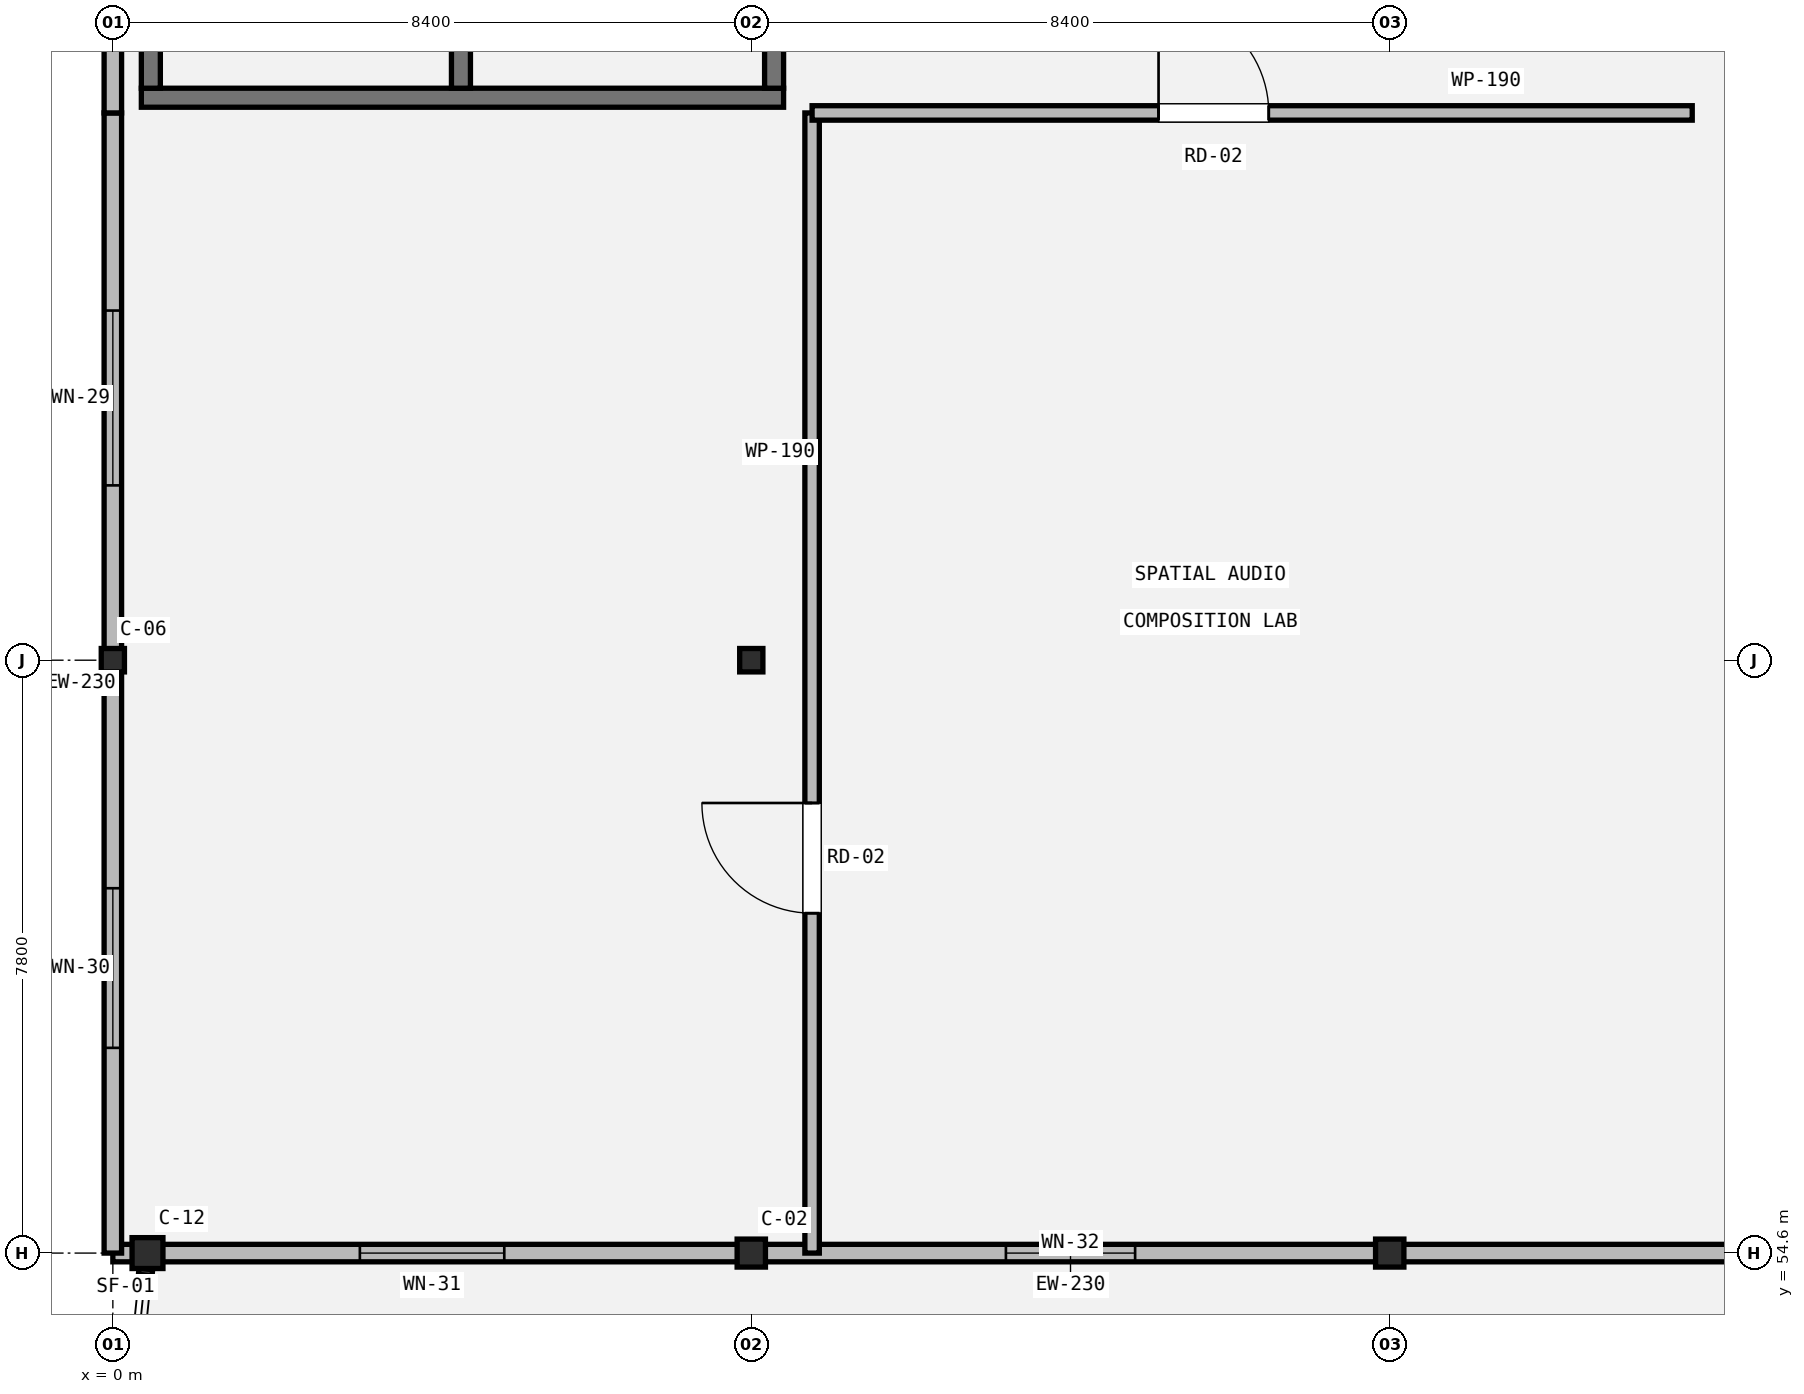
"""IFC4 building model, lengths in metres.
Left out: names, types, materials, properties, quantities, classifications, styles, units other than length and angle.
Written with IfcOpenShell. Run it as: python <this file> out.ifc"""

import sys

from ifc_helpers import new_model, si_unit, direction, frame, frame_2d, origin, origin_2d, place, context, subcontext, project, spatial, rectangle, hollow_circle, i_section, extrude, element, fill, save


model = new_model("IFC4")
c1 = context("Model", 3, precision=1e-05, world=origin(), true_north=direction((0.0, 1.0)))
c2 = subcontext(c1, "Body", "Model", "MODEL_VIEW")
j1 = project(units=[si_unit("LENGTHUNIT", "METRE"), si_unit("PLANEANGLEUNIT", "RADIAN")], contexts=[c1])
p1 = place(None, origin())
s1 = spatial("IfcSite", under=j1, at=p1, CompositionType="ELEMENT")
p2 = place(p1, origin())
s2 = spatial("IfcBuilding", under=s1, at=p2, CompositionType="ELEMENT")
p3 = place(p2, frame((0.0, 0.0, 15.0)))
s3 = spatial("IfcBuildingStorey", under=s2, at=p3, CompositionType="ELEMENT", Elevation=15.0)
for number, where, z_axis, x_axis in (
    (1, (8.4, 54.6, 0.0), (0.0, 0.0, 1.0), (1.0, 0.0, 0.0)),
    (2, (16.8, 54.6, 0.0), (0.0, 0.0, 1.0), (1.0, 0.0, 0.0)),
):
    element("IfcColumn", number, at=place(p3, frame(where, z_axis=z_axis, x_axis=x_axis)), inside=s3, PredefinedType="COLUMN", context=c2, shape_type="SweptSolid", body=[
        extrude(i_section(OverallWidth=0.373, OverallDepth=0.368, WebThickness=0.014, FlangeThickness=0.024, FilletRadius=0.015, at=origin_2d()), origin(), (0.0, 0.0, 1.0), 4.2),
    ])
p4 = place(p3, frame((0.456, 54.6, 0.0), z_axis=(0.0, 0.0, 1.0), x_axis=(1.0, 0.0, 0.0)))
e3 = element("IfcColumn", 3, at=p4, inside=s3, PredefinedType="COLUMN", context=c2, shape_type="SweptSolid", body=[
    extrude(hollow_circle(Radius=0.203, WallThickness=0.016, at=origin_2d()), origin(), (0.0, 0.0, 1.0), 4.2),
])
for number, where, z_axis, x_axis in (
    (4, (0.0, 62.4, 0.0), (0.0, 0.0, 1.0), (1.0, 0.0, 0.0)),
    (5, (8.4, 62.4, 0.0), (0.0, 0.0, 1.0), (1.0, 0.0, 0.0)),
):
    element("IfcColumn", number, at=place(p3, frame(where, z_axis=z_axis, x_axis=x_axis)), inside=s3, PredefinedType="COLUMN", context=c2, shape_type="SweptSolid", body=[
        extrude(i_section(OverallWidth=0.305, OverallDepth=0.308, WebThickness=0.01, FlangeThickness=0.015, FilletRadius=0.015, at=origin_2d()), origin(), (0.0, 0.0, 1.0), 4.2),
    ])
p5 = place(p3, frame((25.2, 54.6, 0.0), z_axis=(0.0, 0.0, 1.0), x_axis=(-1.0, 0.0, 0.0)))
e6 = element("IfcWall", 6, at=p5, inside=s3, PredefinedType="STANDARD", context=c2, shape_type="SweptSolid", body=[
    extrude(rectangle(XDim=25.2, YDim=0.23, at=frame_2d((12.6, 0.0))), origin(), (0.0, 0.0, 1.0), 3.413),
])
p6 = place(p5, frame((2.9, 0.0, 0.9)))
e7 = element("IfcOpeningElement", 7, at=p6, cuts=e6, PredefinedType="OPENING", context=c2, shape_type="SweptSolid", body=[
    extrude(rectangle(XDim=0.9, YDim=1.35, at=frame_2d((0.45, 0.675))), frame((0.0, 0.125, 0.0), z_axis=(0.0, -1.0, 0.0), x_axis=(1.0, 0.0, 0.0)), (0.0, 0.0, 1.0), 0.25),
])
p7 = place(p5, frame((11.75, 0.0, 0.9)))
e8 = element("IfcOpeningElement", 8, at=p7, cuts=e6, PredefinedType="OPENING", context=c2, shape_type="SweptSolid", body=[
    extrude(rectangle(XDim=1.7, YDim=1.95, at=frame_2d((0.85, 0.975))), frame((0.0, 0.125, 0.0), z_axis=(0.0, -1.0, 0.0), x_axis=(1.0, 0.0, 0.0)), (0.0, 0.0, 1.0), 0.25),
])
p8 = place(p5, frame((20.05, 0.0, 0.9)))
e9 = element("IfcOpeningElement", 9, at=p8, cuts=e6, PredefinedType="OPENING", context=c2, shape_type="SweptSolid", body=[
    extrude(rectangle(XDim=1.9, YDim=1.95, at=frame_2d((0.95, 0.975))), frame((0.0, 0.125, 0.0), z_axis=(0.0, -1.0, 0.0), x_axis=(1.0, 0.0, 0.0)), (0.0, 0.0, 1.0), 0.25),
])
p9 = place(p3, frame((0.0, 54.6, 0.0), z_axis=(0.0, 0.0, 1.0), x_axis=(0.0, 1.0, 0.0)))
e10 = element("IfcWall", 10, at=p9, inside=s3, PredefinedType="STANDARD", context=c2, shape_type="SweptSolid", body=[
    extrude(rectangle(XDim=15.0, YDim=0.23, at=frame_2d((7.5, 0.0))), origin(), (0.0, 0.0, 1.0), 3.419),
])
p10 = place(p9, frame((2.7, 0.0, 0.9)))
e11 = element("IfcOpeningElement", 11, at=p10, cuts=e10, PredefinedType="OPENING", context=c2, shape_type="SweptSolid", body=[
    extrude(rectangle(XDim=2.1, YDim=1.95, at=frame_2d((1.05, 0.975))), frame((0.0, 0.125, 0.0), z_axis=(0.0, -1.0, 0.0), x_axis=(1.0, 0.0, 0.0)), (0.0, 0.0, 1.0), 0.25),
])
p11 = place(p9, frame((10.1, 0.0, 0.9)))
e12 = element("IfcOpeningElement", 12, at=p11, cuts=e10, PredefinedType="OPENING", context=c2, shape_type="SweptSolid", body=[
    extrude(rectangle(XDim=2.3, YDim=1.95, at=frame_2d((1.15, 0.975))), frame((0.0, 0.125, 0.0), z_axis=(0.0, -1.0, 0.0), x_axis=(1.0, 0.0, 0.0)), (0.0, 0.0, 1.0), 0.25),
])
p12 = place(p3, frame((0.0, 69.6, 0.0), z_axis=(0.0, 0.0, 1.0), x_axis=(0.0, 1.0, 0.0)))
e13 = element("IfcWall", 13, at=p12, inside=s3, PredefinedType="STANDARD", context=c2, shape_type="SweptSolid", body=[
    extrude(rectangle(XDim=11.0, YDim=0.23, at=frame_2d((5.5, 0.0))), origin(), (0.0, 0.0, 1.0), 2.964),
])
p13 = place(p3, frame((8.825, 69.8, 0.0), z_axis=(0.0, 0.0, 1.0), x_axis=(-1.0, 0.0, 0.0)))
e14 = element("IfcWall", 14, at=p13, inside=s3, PredefinedType="SHEAR", context=c2, shape_type="SweptSolid", body=[
    extrude(rectangle(XDim=8.45, YDim=0.25, at=frame_2d((4.225, 0.0))), origin(), (0.0, 0.0, 1.0), 4.0),
])
for number, where, z_axis, x_axis in (
    (15, (0.5, 69.925, 0.0), (0.0, 0.0, 1.0), (0.0, 1.0, 0.0)),
    (16, (8.7, 79.935, 0.0), (0.0, 0.0, 1.0), (0.0, -1.0, 0.0)),
):
    element("IfcWall", number, at=place(p3, frame(where, z_axis=z_axis, x_axis=x_axis)), inside=s3, PredefinedType="SHEAR", context=c2, shape_type="SweptSolid", body=[
        extrude(rectangle(XDim=10.01, YDim=0.25, at=frame_2d((5.005, 0.0))), origin(), (0.0, 0.0, 1.0), 4.0),
    ])
p14 = place(p3, frame((4.58, 79.935, 0.0), z_axis=(0.0, 0.0, 1.0), x_axis=(0.0, -1.0, 0.0)))
e17 = element("IfcWall", 17, at=p14, inside=s3, PredefinedType="SHEAR", context=c2, shape_type="SweptSolid", body=[
    extrude(rectangle(XDim=10.01, YDim=0.25, at=frame_2d((5.005, 0.0))), origin(), (0.0, 0.0, 1.0), 4.0),
])
p15 = place(p14, frame((8.36, 0.0, 0.0)))
e18 = element("IfcOpeningElement", 18, at=p15, cuts=e17, PredefinedType="OPENING", context=c2, shape_type="SweptSolid", body=[
    extrude(rectangle(XDim=1.1, YDim=2.15, at=frame_2d((0.55, 1.075))), frame((0.0, 0.135, 0.0), z_axis=(0.0, -1.0, 0.0), x_axis=(1.0, 0.0, 0.0)), (0.0, 0.0, 1.0), 0.27),
])
p16 = place(p3, frame((9.2, 54.6, 0.0), z_axis=(0.0, 0.0, 1.0), x_axis=(0.0, 1.0, 0.0)))
e19 = element("IfcWall", 19, at=p16, inside=s3, PredefinedType="PARTITIONING", context=c2, shape_type="SweptSolid", body=[
    extrude(rectangle(XDim=15.0, YDim=0.19, at=frame_2d((7.5, 0.0))), origin(), (0.0, 0.0, 1.0), 3.101),
])
p17 = place(p16, frame((4.471, 0.0, 0.0)))
e20 = element("IfcOpeningElement", 20, at=p17, cuts=e19, PredefinedType="OPENING", context=c2, shape_type="SweptSolid", body=[
    extrude(rectangle(XDim=1.45, YDim=2.2, at=frame_2d((0.725, 1.1))), frame((0.0, 0.105, 0.0), z_axis=(0.0, -1.0, 0.0), x_axis=(1.0, 0.0, 0.0)), (0.0, 0.0, 1.0), 0.21),
])
p18 = place(p3, frame((9.2, 69.6, 0.0), z_axis=(0.0, 0.0, 1.0), x_axis=(1.0, 0.0, 0.0)))
e21 = element("IfcWall", 21, at=p18, inside=s3, PredefinedType="PARTITIONING", context=c2, shape_type="SweptSolid", body=[
    extrude(rectangle(XDim=11.58, YDim=0.19, at=frame_2d((5.79, 0.0))), origin(), (0.0, 0.0, 1.0), 3.546),
])
p19 = place(p18, frame((4.559, 0.0, 0.0)))
e22 = element("IfcOpeningElement", 22, at=p19, cuts=e21, PredefinedType="OPENING", context=c2, shape_type="SweptSolid", body=[
    extrude(rectangle(XDim=1.45, YDim=2.2, at=frame_2d((0.725, 1.1))), frame((0.0, 0.105, 0.0), z_axis=(0.0, -1.0, 0.0), x_axis=(1.0, 0.0, 0.0)), (0.0, 0.0, 1.0), 0.21),
])
p20 = place(p7, origin())
e23 = element("IfcWindow", 23, at=p20, inside=s3, PartitioningType="SINGLE_PANEL", PredefinedType="WINDOW", context=c2, shape_type="SweptSolid", body=[
    extrude(rectangle(XDim=1.7, YDim=1.95, at=frame_2d((0.85, 0.975))), frame((0.0, 0.03, 0.0), z_axis=(0.0, -1.0, 0.0), x_axis=(1.0, 0.0, 0.0)), (0.0, 0.0, 1.0), 0.06),
])
fill(e8, e23)
p21 = place(p8, origin())
e24 = element("IfcWindow", 24, at=p21, inside=s3, PartitioningType="SINGLE_PANEL", PredefinedType="WINDOW", context=c2, shape_type="SweptSolid", body=[
    extrude(rectangle(XDim=1.9, YDim=1.95, at=frame_2d((0.95, 0.975))), frame((0.0, 0.03, 0.0), z_axis=(0.0, -1.0, 0.0), x_axis=(1.0, 0.0, 0.0)), (0.0, 0.0, 1.0), 0.06),
])
fill(e9, e24)
p22 = place(p10, origin())
e25 = element("IfcWindow", 25, at=p22, inside=s3, PartitioningType="SINGLE_PANEL", PredefinedType="WINDOW", context=c2, shape_type="SweptSolid", body=[
    extrude(rectangle(XDim=2.1, YDim=1.95, at=frame_2d((1.05, 0.975))), frame((0.0, 0.03, 0.0), z_axis=(0.0, -1.0, 0.0), x_axis=(1.0, 0.0, 0.0)), (0.0, 0.0, 1.0), 0.06),
])
fill(e11, e25)
p23 = place(p11, origin())
e26 = element("IfcWindow", 26, at=p23, inside=s3, PartitioningType="SINGLE_PANEL", PredefinedType="WINDOW", context=c2, shape_type="SweptSolid", body=[
    extrude(rectangle(XDim=2.3, YDim=1.95, at=frame_2d((1.15, 0.975))), frame((0.0, 0.03, 0.0), z_axis=(0.0, -1.0, 0.0), x_axis=(1.0, 0.0, 0.0)), (0.0, 0.0, 1.0), 0.06),
])
fill(e12, e26)
p24 = place(p17, origin())
e27 = element("IfcDoor", 27, at=p24, inside=s3, OperationType="SINGLE_SWING_RIGHT", PredefinedType="DOOR", context=c2, shape_type="SweptSolid", body=[
    extrude(rectangle(XDim=1.45, YDim=2.2, at=frame_2d((0.725, 1.1))), frame((0.0, 0.025, 0.0), z_axis=(0.0, -1.0, 0.0), x_axis=(1.0, 0.0, 0.0)), (0.0, 0.0, 1.0), 0.05),
])
fill(e20, e27)
p25 = place(p19, origin())
e28 = element("IfcDoor", 28, at=p25, inside=s3, OperationType="SINGLE_SWING_LEFT", PredefinedType="DOOR", context=c2, shape_type="SweptSolid", body=[
    extrude(rectangle(XDim=1.45, YDim=2.2, at=frame_2d((0.725, 1.1))), frame((0.0, 0.025, 0.0), z_axis=(0.0, -1.0, 0.0), x_axis=(1.0, 0.0, 0.0)), (0.0, 0.0, 1.0), 0.05),
])
fill(e22, e28)
save(model, sys.argv[1])
